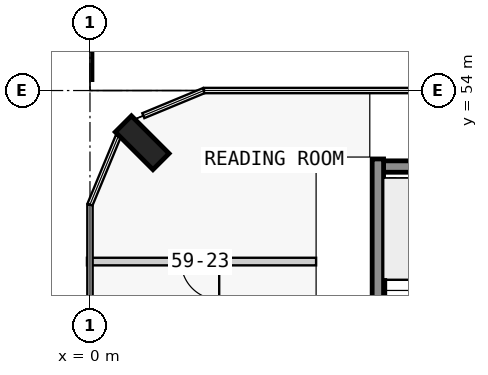
"""IFC4 building model, lengths in metres.
Left out: names, types, materials, properties, quantities, classifications, styles, units other than length and angle.
Written with IfcOpenShell. Run it as: python <this file> out.ifc"""

import sys

from ifc_helpers import new_model, si_unit, direction, frame, frame_2d, origin, origin_2d, place, context, subcontext, project, spatial, rectangle, extrude, element, fill, save


model = new_model("IFC4")
c1 = context("Model", 3, precision=1e-05, world=origin(), true_north=direction((0.0, 1.0)))
c2 = subcontext(c1, "Body", "Model", "MODEL_VIEW")
j1 = project(units=[si_unit("LENGTHUNIT", "METRE"), si_unit("PLANEANGLEUNIT", "RADIAN")], contexts=[c1])
p1 = place(None, origin())
s1 = spatial("IfcSite", under=j1, at=p1, CompositionType="ELEMENT")
p2 = place(p1, origin())
s2 = spatial("IfcBuilding", under=s1, at=p2, CompositionType="ELEMENT")
p3 = place(p2, frame((0.0, 0.0, 225.9)))
s3 = spatial("IfcBuildingStorey", under=s2, at=p3, CompositionType="ELEMENT", Elevation=225.9)
p4 = place(p3, frame((1.374, 52.626, 0.0), z_axis=(0.0, 0.0, 1.0), x_axis=(0.707106781187, 0.707106781187, 0.0)))
e1 = element("IfcColumn", 1, at=p4, inside=s3, PredefinedType="COLUMN", context=c2, shape_type="SweptSolid", body=[
    extrude(rectangle(XDim=0.6, YDim=1.4, at=origin_2d()), origin(), (0.0, 0.0, 1.0), 3.5),
])
p5 = place(p3, frame((7.725, 52.0, 0.0), z_axis=(0.0, 0.0, 1.0), x_axis=(1.0, 0.0, 0.0)))
e2 = element("IfcWall", 2, at=p5, inside=s3, PredefinedType="SHEAR", context=c2, shape_type="SweptSolid", body=[
    extrude(rectangle(XDim=2.55, YDim=0.3, at=frame_2d((1.275, 0.0))), origin(), (0.0, 0.0, 1.0), 3.5),
])
p6 = place(p3, frame((7.575, 45.0, 0.0), z_axis=(0.0, 0.0, 1.0), x_axis=(0.0, 1.0, 0.0)))
e3 = element("IfcWall", 3, at=p6, inside=s3, PredefinedType="SHEAR", context=c2, shape_type="SweptSolid", body=[
    extrude(rectangle(XDim=7.2, YDim=0.3, at=frame_2d((3.6, 0.0))), origin(), (0.0, 0.0, 1.0), 3.5),
])
p7 = place(p3, frame((5.95, 49.5, 0.0), z_axis=(0.0, 0.0, 1.0), x_axis=(-1.0, 0.0, 0.0)))
e4 = element("IfcWall", 4, at=p7, inside=s3, PredefinedType="PARTITIONING", context=c2, shape_type="SweptSolid", body=[
    extrude(rectangle(XDim=6.03, YDim=0.2, at=frame_2d((3.015, 0.0))), origin(), (0.0, 0.0, 1.0), 3.05),
])
p8 = place(p7, frame((2.55, 0.0, 0.0)))
e5 = element("IfcOpeningElement", 5, at=p8, cuts=e4, PredefinedType="OPENING", context=c2, shape_type="SweptSolid", body=[
    extrude(rectangle(XDim=1.0, YDim=2.1, at=frame_2d((0.5, 1.05))), frame((0.0, 0.11, 0.0), z_axis=(0.0, -1.0, 0.0), x_axis=(1.0, 0.0, 0.0)), (0.0, 0.0, 1.0), 0.22),
])
p9 = place(p8, origin())
e6 = element("IfcDoor", 6, at=p9, inside=s3, OperationType="SINGLE_SWING_RIGHT", PredefinedType="DOOR", context=c2, shape_type="SweptSolid", body=[
    extrude(rectangle(XDim=1.0, YDim=2.1, at=frame_2d((0.5, 1.05))), frame((0.0, 0.025, 0.0), z_axis=(0.0, -1.0, 0.0), x_axis=(1.0, 0.0, 0.0)), (0.0, 0.0, 1.0), 0.05),
])
fill(e5, e6)
save(model, sys.argv[1])
